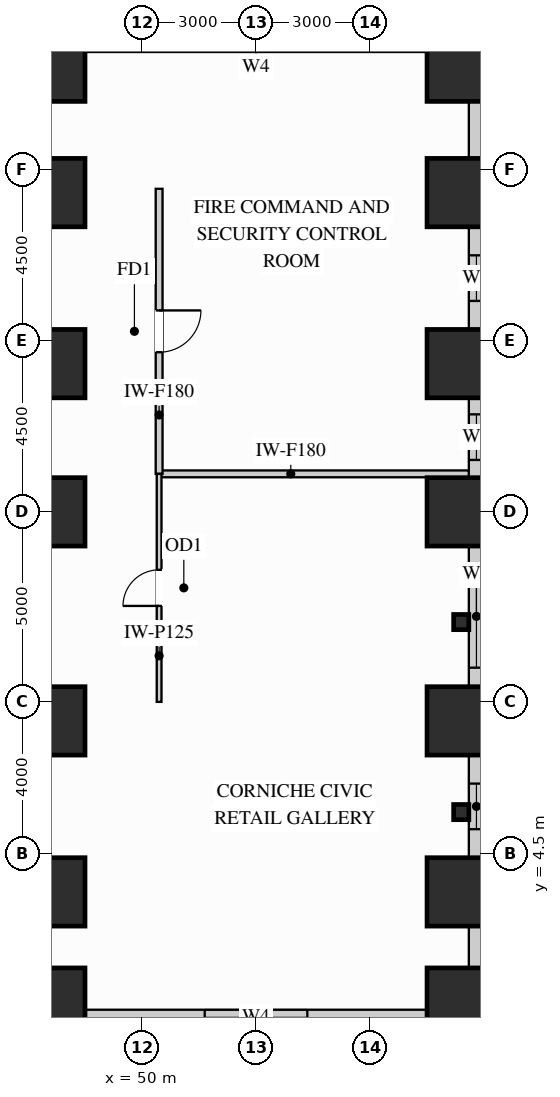
"""IFC4 building model, lengths in metres.
Left out: names, types, materials, properties, quantities, classifications, styles, units other than length and angle.
Written with IfcOpenShell. Run it as: python <this file> out.ifc"""

import sys

from ifc_helpers import new_model, si_unit, direction, frame, frame_2d, origin, origin_2d, place, context, subcontext, project, spatial, rectangle, hollow_rectangle, extrude, source, transform, mapped, element, fill, save


model = new_model("IFC4")
c1 = context("Model", 3, precision=1e-05, world=origin(), true_north=direction((0.0, 1.0)))
c2 = subcontext(c1, "Body", "Model", "MODEL_VIEW")
j1 = project(units=[si_unit("LENGTHUNIT", "METRE"), si_unit("PLANEANGLEUNIT", "RADIAN")], contexts=[c1])
p1 = place(None, origin())
s1 = spatial("IfcSite", under=j1, at=p1, CompositionType="ELEMENT")
p2 = place(p1, origin())
s2 = spatial("IfcBuilding", under=s1, at=p2, CompositionType="ELEMENT")
p3 = place(p2, origin())
s3 = spatial("IfcBuildingStorey", under=s2, at=p3, CompositionType="ELEMENT", Elevation=0.0)
m1 = source(origin(), c2, "Body", "SweptSolid", [
    extrude(rectangle(XDim=1.8, YDim=1.8, at=origin_2d()), origin(), (0.0, 0.0, 1.0), 4.25),
])
for number, where, z_axis, x_axis in (
    (1, (47.6, 0.6, 0.0), (0.0, 0.0, 1.0), (1.0, 0.0, 0.0)),
    (2, (58.4, 0.6, 0.0), (0.0, 0.0, 1.0), (1.0, 0.0, 0.0)),
    (3, (58.4, 3.5, 0.0), (0.0, 0.0, 1.0), (1.0, 0.0, 0.0)),
    (4, (58.4, 8.0, 0.0), (0.0, 0.0, 1.0), (1.0, 0.0, 0.0)),
    (5, (58.4, 13.5, 0.0), (0.0, 0.0, 1.0), (1.0, 0.0, 0.0)),
    (6, (58.4, 17.4, 0.0), (0.0, 0.0, 1.0), (1.0, 0.0, 0.0)),
    (7, (58.4, 21.9, 0.0), (0.0, 0.0, 1.0), (1.0, 0.0, 0.0)),
    (8, (58.4, 25.2, 0.0), (0.0, 0.0, 1.0), (1.0, 0.0, 0.0)),
    (9, (47.6, 3.5, 0.0), (0.0, 0.0, 1.0), (1.0, 0.0, 0.0)),
    (10, (47.6, 8.0, 0.0), (0.0, 0.0, 1.0), (1.0, 0.0, 0.0)),
    (11, (47.6, 13.5, 0.0), (0.0, 0.0, 1.0), (1.0, 0.0, 0.0)),
    (12, (47.6, 17.4, 0.0), (0.0, 0.0, 1.0), (1.0, 0.0, 0.0)),
    (13, (47.6, 21.9, 0.0), (0.0, 0.0, 1.0), (1.0, 0.0, 0.0)),
    (14, (47.6, 25.2, 0.0), (0.0, 0.0, 1.0), (1.0, 0.0, 0.0)),
):
    element("IfcColumn", number, at=place(p3, frame(where, z_axis=z_axis, x_axis=x_axis)), inside=s3, PredefinedType="COLUMN", context=c2, shape_type="MappedRepresentation", body=[
        mapped(m1, transform((0.0, 0.0, 0.0), x_axis=(1.0, 0.0, 0.0), y_axis=(0.0, 1.0, 0.0), z_axis=(0.0, 0.0, 1.0))),
    ])
m2 = source(origin(), c2, "Body", "SweptSolid", [
    extrude(hollow_rectangle(XDim=0.4, YDim=0.4, WallThickness=0.02, at=origin_2d()), origin(), (0.0, 0.0, 1.0), 4.25),
])
for number, where, z_axis, x_axis in (
    (15, (58.4, 5.6, 0.0), (0.0, 0.0, 1.0), (1.0, 0.0, 0.0)),
    (16, (58.4, 10.6, 0.0), (0.0, 0.0, 1.0), (1.0, 0.0, 0.0)),
):
    element("IfcColumn", number, at=place(p3, frame(where, z_axis=z_axis, x_axis=x_axis)), inside=s3, PredefinedType="PILASTER", context=c2, shape_type="MappedRepresentation", body=[
        mapped(m2, transform((0.0, 0.0, 0.0), x_axis=(1.0, 0.0, 0.0), y_axis=(0.0, 1.0, 0.0), z_axis=(0.0, 0.0, 1.0))),
    ])
p4 = place(p3, frame((48.498, 0.2, 0.0), z_axis=(0.0, 0.0, 1.0), x_axis=(1.0, 0.0, 0.0)))
e17 = element("IfcWall", 17, at=p4, inside=s3, PredefinedType="SOLIDWALL", context=c2, shape_type="SweptSolid", body=[
    extrude(rectangle(XDim=9.004, YDim=0.4, at=frame_2d((4.502, 0.0))), origin(), (0.0, 0.0, 1.0), 3.135),
])
p5 = place(p4, frame((3.152, 0.0, 0.65)))
e18 = element("IfcOpeningElement", 18, at=p5, cuts=e17, PredefinedType="OPENING", context=c2, shape_type="SweptSolid", body=[
    extrude(rectangle(XDim=2.7, YDim=2.305, at=frame_2d((1.35, 1.152))), frame((0.0, 0.21, 0.0), z_axis=(0.0, -1.0, 0.0), x_axis=(1.0, 0.0, 0.0)), (0.0, 0.0, 1.0), 0.42),
])
m3 = source(origin(), c2, "Body", "SweptSolid", [
    extrude(rectangle(XDim=1.104, YDim=0.4, at=frame_2d((0.552, 0.0))), origin(), (0.0, 0.0, 1.0), 3.135),
])
p6 = place(p3, frame((58.8, 1.498, 0.0), z_axis=(0.0, 0.0, 1.0), x_axis=(0.0, 1.0, 0.0)))
e19 = element("IfcWall", 19, at=p6, inside=s3, PredefinedType="SOLIDWALL", context=c2, shape_type="MappedRepresentation", body=[
    mapped(m3, transform((0.0, 0.0, 0.0), x_axis=(1.0, 0.0, 0.0), y_axis=(0.0, 1.0, 0.0), z_axis=(0.0, 0.0, 1.0))),
])
p7 = place(p3, frame((58.8, 4.398, 0.0), z_axis=(0.0, 0.0, 1.0), x_axis=(0.0, 1.0, 0.0)))
e20 = element("IfcWall", 20, at=p7, inside=s3, PredefinedType="SOLIDWALL", context=c2, shape_type="SweptSolid", body=[
    extrude(rectangle(XDim=2.704, YDim=0.4, at=frame_2d((1.352, 0.0))), origin(), (0.0, 0.0, 1.0), 3.135),
])
p8 = place(p7, frame((0.752, 0.0, 0.65)))
e21 = element("IfcOpeningElement", 21, at=p8, cuts=e20, PredefinedType="OPENING", context=c2, shape_type="SweptSolid", body=[
    extrude(rectangle(XDim=1.2, YDim=2.305, at=frame_2d((0.6, 1.152))), frame((0.0, 0.21, 0.0), z_axis=(0.0, -1.0, 0.0), x_axis=(1.0, 0.0, 0.0)), (0.0, 0.0, 1.0), 0.42),
])
p9 = place(p3, frame((58.8, 8.898, 0.0), z_axis=(0.0, 0.0, 1.0), x_axis=(0.0, 1.0, 0.0)))
e22 = element("IfcWall", 22, at=p9, inside=s3, PredefinedType="SOLIDWALL", context=c2, shape_type="SweptSolid", body=[
    extrude(rectangle(XDim=3.704, YDim=0.4, at=frame_2d((1.852, 0.0))), origin(), (0.0, 0.0, 1.0), 3.135),
])
p10 = place(p9, frame((0.502, 0.0, 0.65)))
e23 = element("IfcOpeningElement", 23, at=p10, cuts=e22, PredefinedType="OPENING", context=c2, shape_type="SweptSolid", body=[
    extrude(rectangle(XDim=2.7, YDim=2.305, at=frame_2d((1.35, 1.152))), frame((0.0, 0.21, 0.0), z_axis=(0.0, -1.0, 0.0), x_axis=(1.0, 0.0, 0.0)), (0.0, 0.0, 1.0), 0.42),
])
p11 = place(p3, frame((58.8, 14.398, 0.0), z_axis=(0.0, 0.0, 1.0), x_axis=(0.0, 1.0, 0.0)))
e24 = element("IfcWall", 24, at=p11, inside=s3, PredefinedType="SOLIDWALL", context=c2, shape_type="SweptSolid", body=[
    extrude(rectangle(XDim=2.104, YDim=0.4, at=frame_2d((1.052, 0.0))), origin(), (0.0, 0.0, 1.0), 3.135),
])
p12 = place(p11, frame((0.468, 0.0, 0.65)))
e25 = element("IfcOpeningElement", 25, at=p12, cuts=e24, PredefinedType="OPENING", context=c2, shape_type="SweptSolid", body=[
    extrude(rectangle(XDim=1.2, YDim=2.305, at=frame_2d((0.6, 1.152))), frame((0.0, 0.21, 0.0), z_axis=(0.0, -1.0, 0.0), x_axis=(1.0, 0.0, 0.0)), (0.0, 0.0, 1.0), 0.42),
])
p13 = place(p3, frame((58.8, 18.298, 0.0), z_axis=(0.0, 0.0, 1.0), x_axis=(0.0, 1.0, 0.0)))
e26 = element("IfcWall", 26, at=p13, inside=s3, PredefinedType="SOLIDWALL", context=c2, shape_type="SweptSolid", body=[
    extrude(rectangle(XDim=2.704, YDim=0.4, at=frame_2d((1.352, 0.0))), origin(), (0.0, 0.0, 1.0), 3.135),
])
p14 = place(p13, frame((0.752, 0.0, 0.65)))
e27 = element("IfcOpeningElement", 27, at=p14, cuts=e26, PredefinedType="OPENING", context=c2, shape_type="SweptSolid", body=[
    extrude(rectangle(XDim=1.2, YDim=2.305, at=frame_2d((0.6, 1.152))), frame((0.0, 0.21, 0.0), z_axis=(0.0, -1.0, 0.0), x_axis=(1.0, 0.0, 0.0)), (0.0, 0.0, 1.0), 0.42),
])
m4 = source(origin(), c2, "Body", "SweptSolid", [
    extrude(rectangle(XDim=1.504, YDim=0.4, at=frame_2d((0.752, 0.0))), origin(), (0.0, 0.0, 1.0), 3.135),
])
p15 = place(p3, frame((58.8, 22.798, 0.0), z_axis=(0.0, 0.0, 1.0), x_axis=(0.0, 1.0, 0.0)))
e28 = element("IfcWall", 28, at=p15, inside=s3, PredefinedType="SOLIDWALL", context=c2, shape_type="MappedRepresentation", body=[
    mapped(m4, transform((0.0, 0.0, 0.0), x_axis=(1.0, 0.0, 0.0), y_axis=(0.0, 1.0, 0.0), z_axis=(0.0, 0.0, 1.0))),
])
m5 = source(origin(), c2, "Body", "SweptSolid", [
    extrude(rectangle(XDim=8.148, YDim=0.18, at=frame_2d((4.074, 0.0))), origin(), (0.0, 0.0, 1.0), 3.686),
])
p16 = place(p3, frame((50.45, 14.5, 0.0), z_axis=(0.0, 0.0, 1.0), x_axis=(1.0, 0.0, 0.0)))
e29 = element("IfcWall", 29, at=p16, inside=s3, PredefinedType="PARTITIONING", context=c2, shape_type="MappedRepresentation", body=[
    mapped(m5, transform((0.0, 0.0, 0.0), x_axis=(1.0, 0.0, 0.0), y_axis=(0.0, 1.0, 0.0), z_axis=(0.0, 0.0, 1.0))),
])
p17 = place(p3, frame((50.45, 14.5, 0.0), z_axis=(0.0, 0.0, 1.0), x_axis=(0.0, 1.0, 0.0)))
e30 = element("IfcWall", 30, at=p17, inside=s3, PredefinedType="PARTITIONING", context=c2, shape_type="SweptSolid", body=[
    extrude(rectangle(XDim=7.5, YDim=0.18, at=frame_2d((3.75, 0.0))), origin(), (0.0, 0.0, 1.0), 4.235),
])
p18 = place(p17, frame((3.2, 0.0, 0.0)))
e31 = element("IfcOpeningElement", 31, at=p18, cuts=e30, PredefinedType="OPENING", context=c2, shape_type="SweptSolid", body=[
    extrude(rectangle(XDim=1.1, YDim=2.15, at=frame_2d((0.55, 1.075))), frame((0.0, 0.1, 0.0), z_axis=(0.0, -1.0, 0.0), x_axis=(1.0, 0.0, 0.0)), (0.0, 0.0, 1.0), 0.2),
])
p19 = place(p3, frame((50.45, 8.5, 0.0), z_axis=(0.0, 0.0, 1.0), x_axis=(0.0, 1.0, 0.0)))
e32 = element("IfcWall", 32, at=p19, inside=s3, PredefinedType="PARTITIONING", context=c2, shape_type="SweptSolid", body=[
    extrude(rectangle(XDim=6.0, YDim=0.125, at=frame_2d((3.0, 0.0))), origin(), (0.0, 0.0, 1.0), 4.235),
])
p20 = place(p19, frame((2.525, 0.0, 0.0)))
e33 = element("IfcOpeningElement", 33, at=p20, cuts=e32, PredefinedType="OPENING", context=c2, shape_type="SweptSolid", body=[
    extrude(rectangle(XDim=0.95, YDim=2.15, at=frame_2d((0.475, 1.075))), frame((0.0, 0.073, 0.0), z_axis=(0.0, -1.0, 0.0), x_axis=(1.0, 0.0, 0.0)), (0.0, 0.0, 1.0), 0.145),
])
m6 = source(origin(), c2, "Body", "SweptSolid", [
    extrude(rectangle(XDim=1.1, YDim=2.15, at=frame_2d((0.55, 1.075))), frame((0.0, 0.025, 0.0), z_axis=(0.0, -1.0, 0.0), x_axis=(1.0, 0.0, 0.0)), (0.0, 0.0, 1.0), 0.05),
])
p21 = place(p18, origin())
e34 = element("IfcDoor", 34, at=p21, inside=s3, OperationType="SINGLE_SWING_RIGHT", PredefinedType="DOOR", context=c2, shape_type="MappedRepresentation", body=[
    mapped(m6, transform((0.0, 0.0, 0.0), x_axis=(1.0, 0.0, 0.0), y_axis=(0.0, 1.0, 0.0), z_axis=(0.0, 0.0, 1.0))),
])
fill(e31, e34)
m7 = source(origin(), c2, "Body", "SweptSolid", [
    extrude(rectangle(XDim=0.95, YDim=2.15, at=frame_2d((0.475, 1.075))), frame((0.0, 0.025, 0.0), z_axis=(0.0, -1.0, 0.0), x_axis=(1.0, 0.0, 0.0)), (0.0, 0.0, 1.0), 0.05),
])
p22 = place(p20, origin())
e35 = element("IfcDoor", 35, at=p22, inside=s3, OperationType="SINGLE_SWING_LEFT", PredefinedType="DOOR", context=c2, shape_type="MappedRepresentation", body=[
    mapped(m7, transform((0.0, 0.0, 0.0), x_axis=(1.0, 0.0, 0.0), y_axis=(0.0, 1.0, 0.0), z_axis=(0.0, 0.0, 1.0))),
])
fill(e33, e35)
m8 = source(origin(), c2, "Body", "SweptSolid", [
    extrude(rectangle(XDim=1.2, YDim=2.305, at=frame_2d((0.6, 1.152))), frame((0.0, 0.03, 0.0), z_axis=(0.0, -1.0, 0.0), x_axis=(1.0, 0.0, 0.0)), (0.0, 0.0, 1.0), 0.06),
])
p23 = place(p8, origin())
e36 = element("IfcWindow", 36, at=p23, inside=s3, PartitioningType="SINGLE_PANEL", PredefinedType="WINDOW", context=c2, shape_type="MappedRepresentation", body=[
    mapped(m8, transform((0.0, 0.0, 0.0), x_axis=(1.0, 0.0, 0.0), y_axis=(0.0, 1.0, 0.0), z_axis=(0.0, 0.0, 1.0))),
])
fill(e21, e36)
p24 = place(p12, origin())
e37 = element("IfcWindow", 37, at=p24, inside=s3, PartitioningType="SINGLE_PANEL", PredefinedType="WINDOW", context=c2, shape_type="MappedRepresentation", body=[
    mapped(m8, transform((0.0, 0.0, 0.0), x_axis=(1.0, 0.0, 0.0), y_axis=(0.0, 1.0, 0.0), z_axis=(0.0, 0.0, 1.0))),
])
fill(e25, e37)
p25 = place(p14, origin())
e38 = element("IfcWindow", 38, at=p25, inside=s3, PartitioningType="SINGLE_PANEL", PredefinedType="WINDOW", context=c2, shape_type="MappedRepresentation", body=[
    mapped(m8, transform((0.0, 0.0, 0.0), x_axis=(1.0, 0.0, 0.0), y_axis=(0.0, 1.0, 0.0), z_axis=(0.0, 0.0, 1.0))),
])
fill(e27, e38)
m9 = source(origin(), c2, "Body", "SweptSolid", [
    extrude(rectangle(XDim=2.7, YDim=2.305, at=frame_2d((1.35, 1.152))), frame((0.0, 0.03, 0.0), z_axis=(0.0, -1.0, 0.0), x_axis=(1.0, 0.0, 0.0)), (0.0, 0.0, 1.0), 0.06),
])
p26 = place(p5, origin())
e39 = element("IfcWindow", 39, at=p26, inside=s3, PartitioningType="SINGLE_PANEL", PredefinedType="WINDOW", context=c2, shape_type="MappedRepresentation", body=[
    mapped(m9, transform((0.0, 0.0, 0.0), x_axis=(1.0, 0.0, 0.0), y_axis=(0.0, 1.0, 0.0), z_axis=(0.0, 0.0, 1.0))),
])
fill(e18, e39)
p27 = place(p10, origin())
e40 = element("IfcWindow", 40, at=p27, inside=s3, PartitioningType="SINGLE_PANEL", PredefinedType="WINDOW", context=c2, shape_type="MappedRepresentation", body=[
    mapped(m9, transform((0.0, 0.0, 0.0), x_axis=(1.0, 0.0, 0.0), y_axis=(0.0, 1.0, 0.0), z_axis=(0.0, 0.0, 1.0))),
])
fill(e23, e40)
save(model, sys.argv[1])
